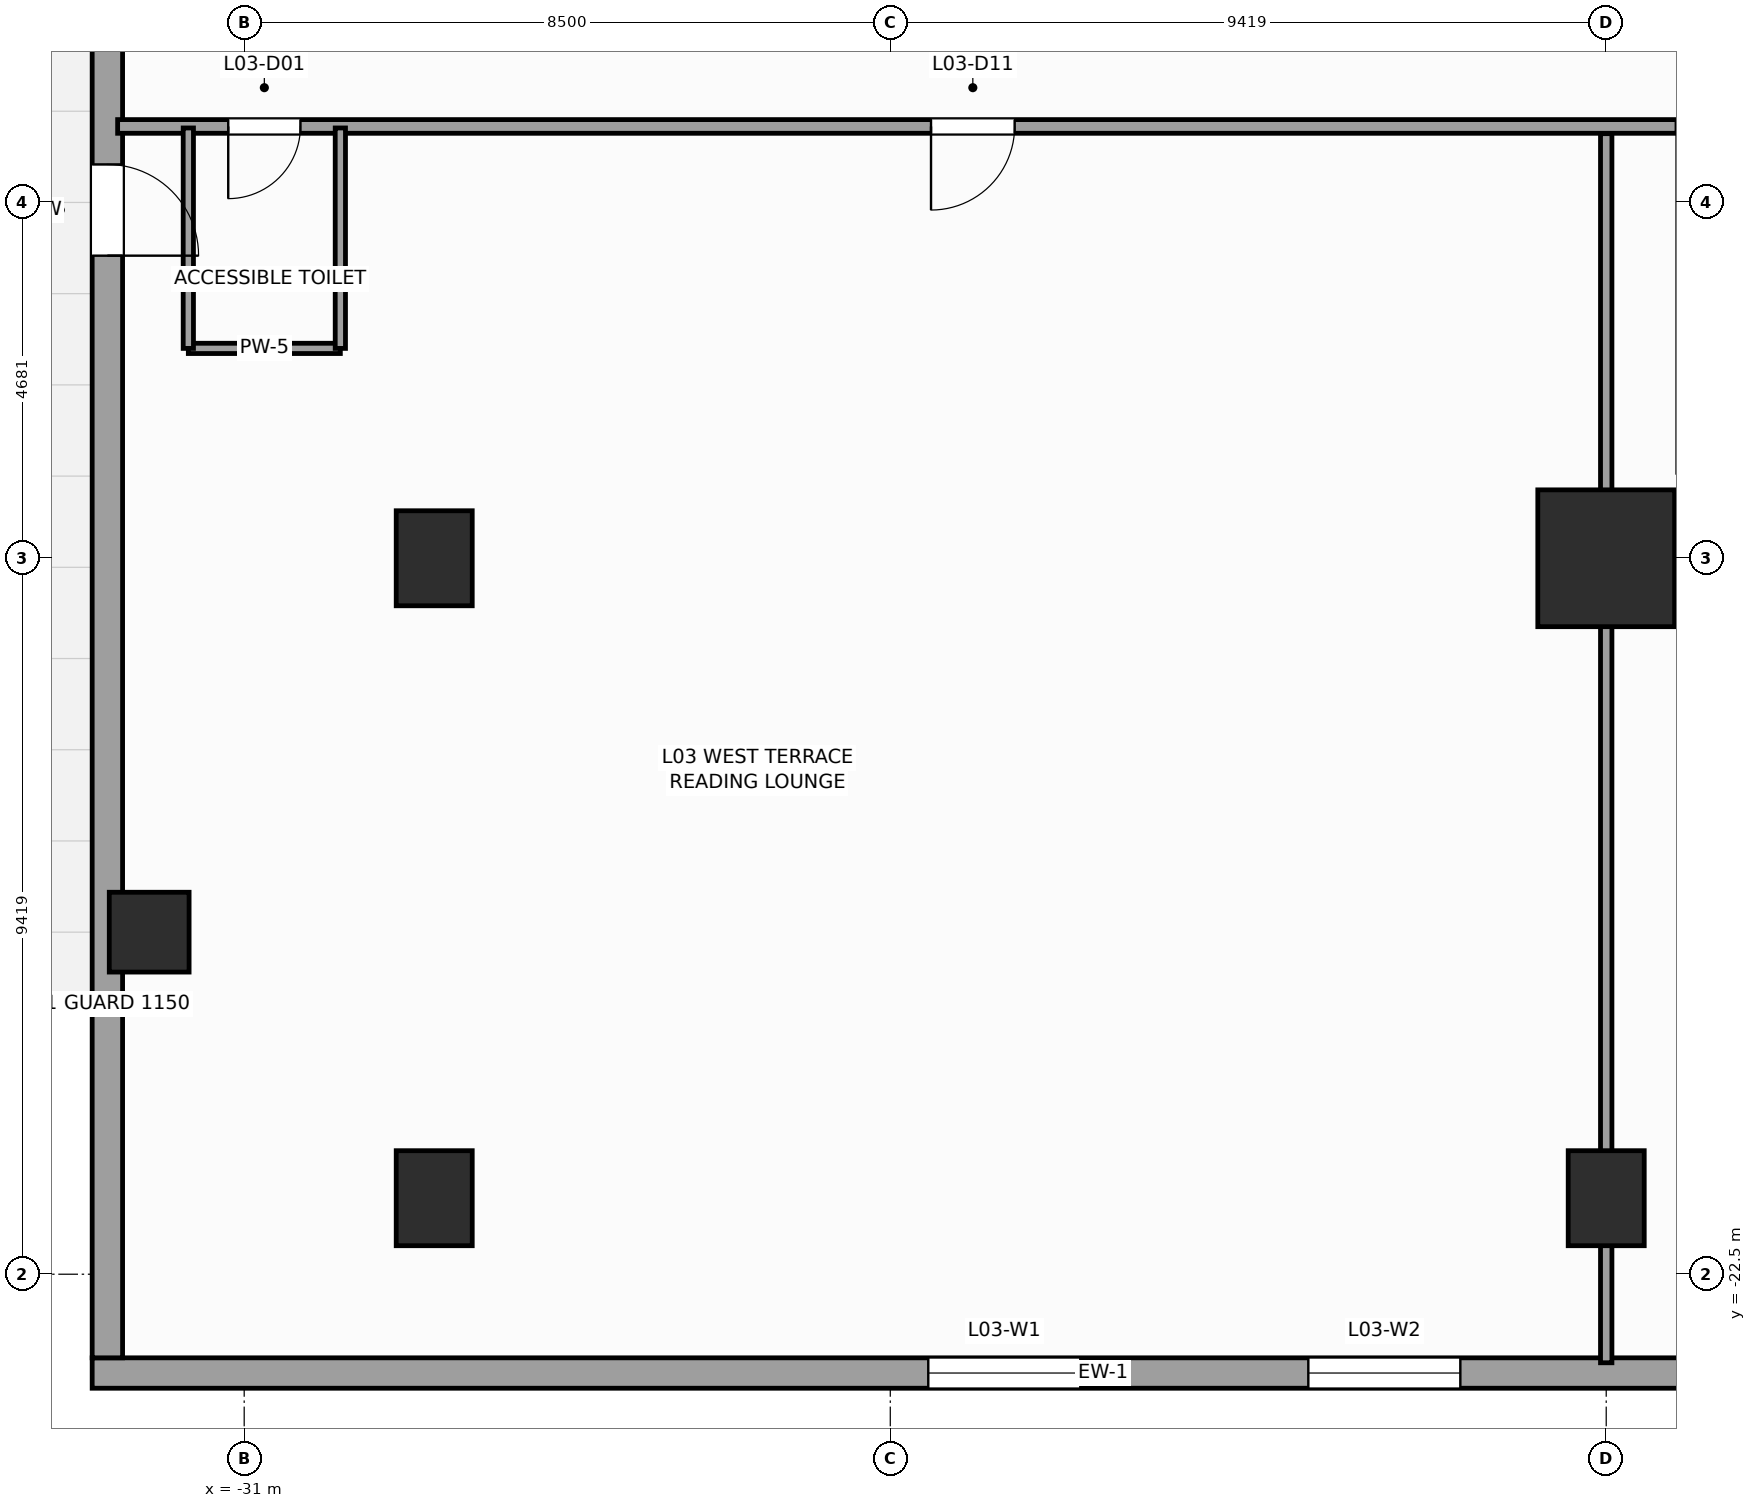
"""IFC4 building model, lengths in metres.
Left out: names, types, materials, properties, quantities, classifications, styles, units other than length and angle.
Written with IfcOpenShell. Run it as: python <this file> out.ifc"""

import sys

from ifc_helpers import new_model, si_unit, direction, frame, frame_2d, origin, origin_2d, place, context, subcontext, project, spatial, rectangle, extrude, source, transform, mapped, element, fill, save


model = new_model("IFC4")
c1 = context("Model", 3, precision=1e-05, world=origin(), true_north=direction((0.0, 1.0)))
c2 = subcontext(c1, "Body", "Model", "MODEL_VIEW")
j1 = project(units=[si_unit("LENGTHUNIT", "METRE"), si_unit("PLANEANGLEUNIT", "RADIAN")], contexts=[c1])
p1 = place(None, origin())
s1 = spatial("IfcSite", under=j1, at=p1, CompositionType="ELEMENT")
p2 = place(p1, origin())
s2 = spatial("IfcBuilding", under=s1, at=p2, CompositionType="ELEMENT")
p3 = place(p2, frame((0.0, 0.0, 16.0)))
s3 = spatial("IfcBuildingStorey", under=s2, at=p3, CompositionType="ELEMENT", Elevation=16.0)
m1 = source(origin(), c2, "Body", "SweptSolid", [
    extrude(rectangle(XDim=1.8, YDim=1.8, at=origin_2d()), origin(), (0.0, 0.0, 1.0), 5.0),
])
p4 = place(p3, frame((-13.081, -13.081, 0.0), z_axis=(0.0, 0.0, 1.0), x_axis=(1.0, 0.0, 0.0)))
e1 = element("IfcColumn", 1, at=p4, inside=s3, PredefinedType="COLUMN", context=c2, shape_type="MappedRepresentation", body=[
    mapped(m1, transform((0.0, 0.0, 0.0), scale=1.0)),
])
m2 = source(origin(), c2, "Body", "SweptSolid", [
    extrude(rectangle(XDim=1.0, YDim=1.25, at=origin_2d()), origin(), (0.0, 0.0, 1.0), 5.0),
])
for number, where, z_axis, x_axis in (
    (2, (-28.5, -21.5, 0.0), (0.0, 0.0, 1.0), (1.0, 0.0, 0.0)),
    (3, (-13.081, -21.5, 0.0), (0.0, 0.0, 1.0), (1.0, 0.0, 0.0)),
    (4, (-28.5, -13.081, 0.0), (0.0, 0.0, 1.0), (1.0, 0.0, 0.0)),
):
    element("IfcColumn", number, at=place(p3, frame(where, z_axis=z_axis, x_axis=x_axis)), inside=s3, PredefinedType="COLUMN", context=c2, shape_type="MappedRepresentation", body=[
        mapped(m2, transform((0.0, 0.0, 0.0), scale=1.0)),
    ])
m3 = source(origin(), c2, "Body", "SweptSolid", [
    extrude(rectangle(XDim=1.05, YDim=1.05, at=origin_2d()), origin(), (0.0, 0.0, 1.0), 5.0),
])
p5 = place(p3, frame((-32.25, -18.0, 0.0), z_axis=(0.0, 0.0, 1.0), x_axis=(1.0, 0.0, 0.0)))
e5 = element("IfcColumn", 5, at=p5, inside=s3, PredefinedType="COLUMN", context=c2, shape_type="MappedRepresentation", body=[
    mapped(m3, transform((0.0, 0.0, 0.0), scale=1.0)),
])
p6 = place(p3, frame((-33.0, -23.8, 0.0), z_axis=(0.0, 0.0, 1.0), x_axis=(1.0, 0.0, 0.0)))
e6 = element("IfcWall", 6, at=p6, inside=s3, PredefinedType="STANDARD", context=c2, shape_type="SweptSolid", body=[
    extrude(rectangle(XDim=26.6, YDim=0.4, at=frame_2d((13.3, 0.0))), origin(), (0.0, 0.0, 1.0), 4.66),
])
p7 = place(p6, frame((11.0, 0.0, 0.85)))
e7 = element("IfcOpeningElement", 7, at=p7, cuts=e6, PredefinedType="OPENING", context=c2, shape_type="SweptSolid", body=[
    extrude(rectangle(XDim=2.0, YDim=2.8, at=frame_2d((1.0, 1.4))), frame((0.0, 0.21, 0.0), z_axis=(0.0, -1.0, 0.0), x_axis=(1.0, 0.0, 0.0)), (0.0, 0.0, 1.0), 0.42),
])
p8 = place(p6, frame((16.0, 0.0, 0.85)))
e8 = element("IfcOpeningElement", 8, at=p8, cuts=e6, PredefinedType="OPENING", context=c2, shape_type="SweptSolid", body=[
    extrude(rectangle(XDim=2.0, YDim=2.8, at=frame_2d((1.0, 1.4))), frame((0.0, 0.21, 0.0), z_axis=(0.0, -1.0, 0.0), x_axis=(1.0, 0.0, 0.0)), (0.0, 0.0, 1.0), 0.42),
])
p9 = place(p6, frame((21.5, 0.0, 0.85)))
e9 = element("IfcOpeningElement", 9, at=p9, cuts=e6, PredefinedType="OPENING", context=c2, shape_type="SweptSolid", body=[
    extrude(rectangle(XDim=2.0, YDim=2.8, at=frame_2d((1.0, 1.4))), frame((0.0, 0.21, 0.0), z_axis=(0.0, -1.0, 0.0), x_axis=(1.0, 0.0, 0.0)), (0.0, 0.0, 1.0), 0.42),
])
p10 = place(p3, frame((-32.8, -23.6, 0.0), z_axis=(0.0, 0.0, 1.0), x_axis=(0.0, 1.0, 0.0)))
e10 = element("IfcWall", 10, at=p10, inside=s3, PredefinedType="STANDARD", context=c2, shape_type="SweptSolid", body=[
    extrude(rectangle(XDim=47.2, YDim=0.4, at=frame_2d((23.6, 0.0))), origin(), (0.0, 0.0, 1.0), 4.66),
])
p11 = place(p10, frame((14.5, 0.0, 0.0)))
e11 = element("IfcOpeningElement", 11, at=p11, cuts=e10, PredefinedType="OPENING", context=c2, shape_type="SweptSolid", body=[
    extrude(rectangle(XDim=1.2, YDim=2.3, at=frame_2d((0.6, 1.15))), frame((0.0, 0.21, 0.0), z_axis=(0.0, -1.0, 0.0), x_axis=(1.0, 0.0, 0.0)), (0.0, 0.0, 1.0), 0.42),
])
p12 = place(p3, frame((-32.665, -7.4, 0.0), z_axis=(0.0, 0.0, 1.0), x_axis=(1.0, 0.0, 0.0)))
e12 = element("IfcWall", 12, at=p12, inside=s3, PredefinedType="PARTITIONING", context=c2, shape_type="SweptSolid", body=[
    extrude(rectangle(XDim=20.515, YDim=0.18, at=frame_2d((10.258, 0.0))), origin(), (0.0, 0.0, 1.0), 4.66),
])
p13 = place(p12, frame((1.455, 0.0, 0.0)))
e13 = element("IfcOpeningElement", 13, at=p13, cuts=e12, PredefinedType="OPENING", context=c2, shape_type="SweptSolid", body=[
    extrude(rectangle(XDim=0.95, YDim=2.1, at=frame_2d((0.475, 1.05))), frame((0.0, 0.1, 0.0), z_axis=(0.0, -1.0, 0.0), x_axis=(1.0, 0.0, 0.0)), (0.0, 0.0, 1.0), 0.2),
])
p14 = place(p12, frame((10.701, 0.0, 0.0)))
e14 = element("IfcOpeningElement", 14, at=p14, cuts=e12, PredefinedType="OPENING", context=c2, shape_type="SweptSolid", body=[
    extrude(rectangle(XDim=1.1, YDim=2.2, at=frame_2d((0.55, 1.1))), frame((0.0, 0.1, 0.0), z_axis=(0.0, -1.0, 0.0), x_axis=(1.0, 0.0, 0.0)), (0.0, 0.0, 1.0), 0.2),
])
p15 = place(p3, frame((-13.081, -23.665, 0.0), z_axis=(0.0, 0.0, 1.0), x_axis=(0.0, 1.0, 0.0)))
e15 = element("IfcWall", 15, at=p15, inside=s3, PredefinedType="PARTITIONING", context=c2, shape_type="SweptSolid", body=[
    extrude(rectangle(XDim=16.17, YDim=0.15, at=frame_2d((8.085, 0.0))), origin(), (0.0, 0.0, 1.0), 3.652),
])
p16 = place(p3, frame((-31.735, -10.32, 0.0), z_axis=(0.0, 0.0, 1.0), x_axis=(1.0, 0.0, 0.0)))
e16 = element("IfcWall", 16, at=p16, inside=s3, PredefinedType="PARTITIONING", context=c2, shape_type="SweptSolid", body=[
    extrude(rectangle(XDim=2.0, YDim=0.135, at=frame_2d((1.0, 0.0))), origin(), (0.0, 0.0, 1.0), 4.66),
])
for number, where, z_axis, x_axis in (
    (17, (-29.735, -10.32, 0.0), (0.0, 0.0, 1.0), (0.0, 1.0, 0.0)),
    (18, (-31.735, -10.32, 0.0), (0.0, 0.0, 1.0), (0.0, 1.0, 0.0)),
):
    element("IfcWall", number, at=place(p3, frame(where, z_axis=z_axis, x_axis=x_axis)), inside=s3, PredefinedType="PARTITIONING", context=c2, shape_type="SweptSolid", body=[
        extrude(rectangle(XDim=2.9, YDim=0.135, at=frame_2d((1.45, 0.0))), origin(), (0.0, 0.0, 1.0), 4.66),
    ])
m4 = source(origin(), c2, "Body", "SweptSolid", [
    extrude(rectangle(XDim=2.0, YDim=2.8, at=frame_2d((1.0, 1.4))), frame((0.0, 0.03, 0.0), z_axis=(0.0, -1.0, 0.0), x_axis=(1.0, 0.0, 0.0)), (0.0, 0.0, 1.0), 0.06),
])
p17 = place(p7, origin())
e19 = element("IfcWindow", 19, at=p17, inside=s3, PartitioningType="SINGLE_PANEL", PredefinedType="WINDOW", context=c2, shape_type="MappedRepresentation", body=[
    mapped(m4, transform((0.0, 0.0, 0.0), scale=1.0)),
])
fill(e7, e19)
p18 = place(p8, origin())
e20 = element("IfcWindow", 20, at=p18, inside=s3, PartitioningType="SINGLE_PANEL", PredefinedType="WINDOW", context=c2, shape_type="MappedRepresentation", body=[
    mapped(m4, transform((0.0, 0.0, 0.0), scale=1.0)),
])
fill(e8, e20)
m5 = source(origin(), c2, "Body", "SweptSolid", [
    extrude(rectangle(XDim=1.2, YDim=2.3, at=frame_2d((0.6, 1.15))), frame((0.0, 0.025, 0.0), z_axis=(0.0, -1.0, 0.0), x_axis=(1.0, 0.0, 0.0)), (0.0, 0.0, 1.0), 0.05),
])
p19 = place(p11, frame((1.2, 0.0, 0.0), z_axis=(0.0, 0.0, 1.0), x_axis=(-1.0, 0.0, 0.0)))
e21 = element("IfcDoor", 21, at=p19, inside=s3, OperationType="SINGLE_SWING_LEFT", PredefinedType="DOOR", context=c2, shape_type="MappedRepresentation", body=[
    mapped(m5, transform((0.0, 0.0, 0.0), scale=1.0)),
])
fill(e11, e21)
m6 = source(origin(), c2, "Body", "SweptSolid", [
    extrude(rectangle(XDim=0.95, YDim=2.1, at=frame_2d((0.475, 1.05))), frame((0.0, 0.025, 0.0), z_axis=(0.0, -1.0, 0.0), x_axis=(1.0, 0.0, 0.0)), (0.0, 0.0, 1.0), 0.05),
])
p20 = place(p13, frame((0.95, 0.0, 0.0), z_axis=(0.0, 0.0, 1.0), x_axis=(-1.0, 0.0, 0.0)))
e22 = element("IfcDoor", 22, at=p20, inside=s3, OperationType="SINGLE_SWING_LEFT", PredefinedType="DOOR", context=c2, shape_type="MappedRepresentation", body=[
    mapped(m6, transform((0.0, 0.0, 0.0), scale=1.0)),
])
fill(e13, e22)
m7 = source(origin(), c2, "Body", "SweptSolid", [
    extrude(rectangle(XDim=1.1, YDim=2.2, at=frame_2d((0.55, 1.1))), frame((0.0, 0.025, 0.0), z_axis=(0.0, -1.0, 0.0), x_axis=(1.0, 0.0, 0.0)), (0.0, 0.0, 1.0), 0.05),
])
p21 = place(p14, frame((1.1, 0.0, 0.0), z_axis=(0.0, 0.0, 1.0), x_axis=(-1.0, 0.0, 0.0)))
e23 = element("IfcDoor", 23, at=p21, inside=s3, OperationType="SINGLE_SWING_LEFT", PredefinedType="DOOR", context=c2, shape_type="MappedRepresentation", body=[
    mapped(m7, transform((0.0, 0.0, 0.0), scale=1.0)),
])
fill(e14, e23)
save(model, sys.argv[1])
